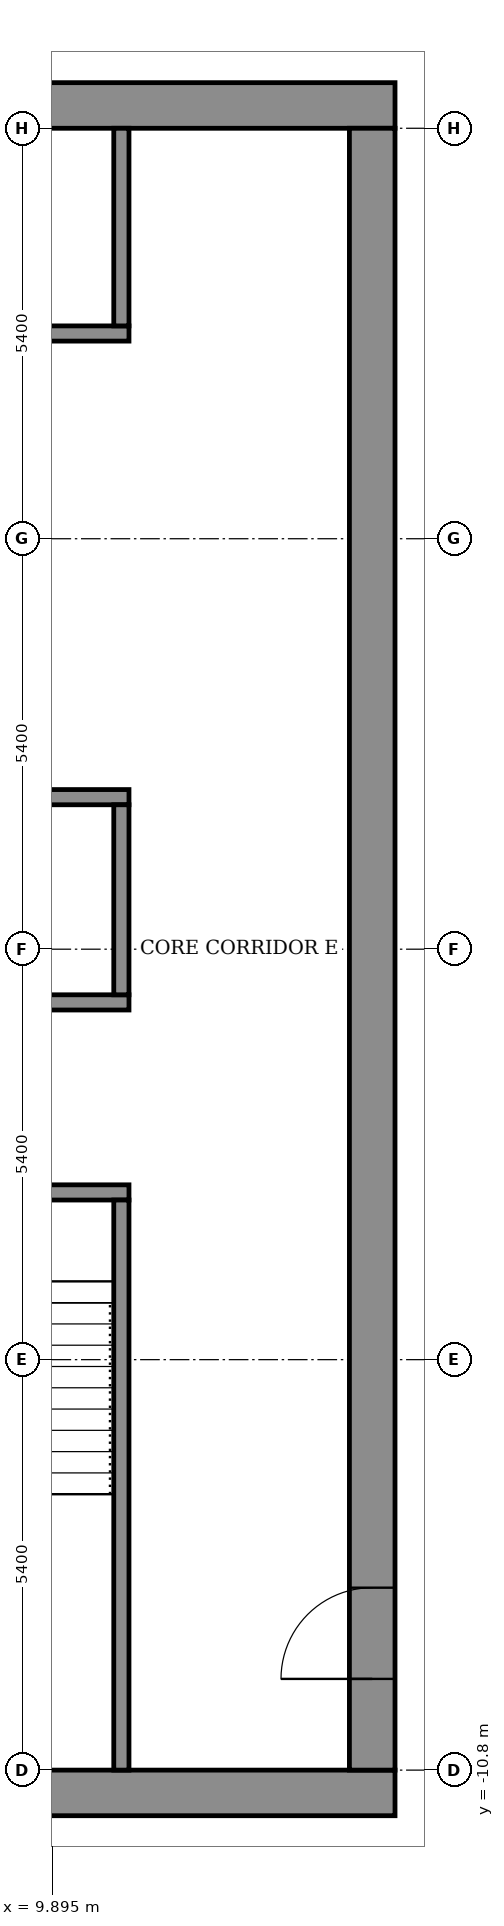
"""IFC4 building model, lengths in metres.
Left out: names, types, materials, properties, quantities, classifications, styles, units other than length and angle.
Written with IfcOpenShell. Run it as: python <this file> out.ifc"""

import sys

from ifc_helpers import new_model, si_unit, direction, frame, frame_2d, origin, place, context, subcontext, project, spatial, rectangle, extrude, element, fill, save


model = new_model("IFC4")
c1 = context("Model", 3, precision=1e-05, world=origin(), true_north=direction((0.0, 1.0)))
c2 = subcontext(c1, "Body", "Model", "MODEL_VIEW")
j1 = project(units=[si_unit("LENGTHUNIT", "METRE"), si_unit("PLANEANGLEUNIT", "RADIAN")], contexts=[c1])
p1 = place(None, origin())
s1 = spatial("IfcSite", under=j1, at=p1, CompositionType="ELEMENT")
p2 = place(p1, origin())
s2 = spatial("IfcBuilding", under=s1, at=p2, CompositionType="ELEMENT")
p3 = place(p2, frame((0.0, 0.0, 342.5)))
s3 = spatial("IfcBuildingStorey", under=s2, at=p3, CompositionType="ELEMENT", Elevation=342.5)
for number, where, z_axis, x_axis in (
    (1, (-14.4, -11.1, 0.0), (0.0, 0.0, 1.0), (1.0, 0.0, 0.0)),
    (2, (-14.4, 11.1, 0.0), (0.0, 0.0, 1.0), (1.0, 0.0, 0.0)),
):
    element("IfcWall", number, at=place(p3, frame(where, z_axis=z_axis, x_axis=x_axis)), inside=s3, PredefinedType="SHEAR", context=c2, shape_type="SweptSolid", body=[
        extrude(rectangle(XDim=28.8, YDim=0.6, at=frame_2d((14.4, 0.0))), origin(), (0.0, 0.0, 1.0), 3.6),
    ])
p4 = place(p3, frame((14.1, -10.8, 0.0), z_axis=(0.0, 0.0, 1.0), x_axis=(0.0, 1.0, 0.0)))
e3 = element("IfcWall", 3, at=p4, inside=s3, PredefinedType="SHEAR", context=c2, shape_type="SweptSolid", body=[
    extrude(rectangle(XDim=21.6, YDim=0.6, at=frame_2d((10.8, 0.0))), origin(), (0.0, 0.0, 1.0), 3.6),
])
p5 = place(p4, frame((1.2, 0.0, 0.0)))
e4 = element("IfcOpeningElement", 4, at=p5, cuts=e3, PredefinedType="OPENING", context=c2, shape_type="SweptSolid", body=[
    extrude(rectangle(XDim=1.2, YDim=2.1, at=frame_2d((0.6, 1.05))), frame((0.0, 0.31, 0.0), z_axis=(0.0, -1.0, 0.0), x_axis=(1.0, 0.0, 0.0)), (0.0, 0.0, 1.0), 0.62),
])
p6 = place(p3, frame((-10.9, -3.2, 0.0), z_axis=(0.0, 0.0, 1.0), x_axis=(1.0, 0.0, 0.0)))
e5 = element("IfcWall", 5, at=p6, inside=s3, PredefinedType="SHEAR", context=c2, shape_type="SweptSolid", body=[
    extrude(rectangle(XDim=21.8, YDim=0.2, at=frame_2d((10.9, 0.0))), origin(), (0.0, 0.0, 1.0), 3.05),
])
p7 = place(p6, frame((1.075, 0.0, 0.0)))
e6 = element("IfcOpeningElement", 6, at=p7, cuts=e5, PredefinedType="OPENING", context=c2, shape_type="SweptSolid", body=[
    extrude(rectangle(XDim=1.1, YDim=2.1, at=frame_2d((0.55, 1.05))), frame((0.0, 0.11, 0.0), z_axis=(0.0, -1.0, 0.0), x_axis=(1.0, 0.0, 0.0)), (0.0, 0.0, 1.0), 0.22),
])
p8 = place(p6, frame((10.325, 0.0, 0.0)))
e7 = element("IfcOpeningElement", 7, at=p8, cuts=e5, PredefinedType="OPENING", context=c2, shape_type="SweptSolid", body=[
    extrude(rectangle(XDim=1.1, YDim=2.1, at=frame_2d((0.55, 1.05))), frame((0.0, 0.11, 0.0), z_axis=(0.0, -1.0, 0.0), x_axis=(1.0, 0.0, 0.0)), (0.0, 0.0, 1.0), 0.22),
])
p9 = place(p6, frame((19.625, 0.0, 0.0)))
e8 = element("IfcOpeningElement", 8, at=p9, cuts=e5, PredefinedType="OPENING", context=c2, shape_type="SweptSolid", body=[
    extrude(rectangle(XDim=1.1, YDim=2.1, at=frame_2d((0.55, 1.05))), frame((0.0, 0.11, 0.0), z_axis=(0.0, -1.0, 0.0), x_axis=(1.0, 0.0, 0.0)), (0.0, 0.0, 1.0), 0.22),
])
p10 = place(p6, frame((5.7, 0.0, 0.0)))
e9 = element("IfcOpeningElement", 9, at=p10, cuts=e5, PredefinedType="OPENING", context=c2, shape_type="SweptSolid", body=[
    extrude(rectangle(XDim=1.1, YDim=2.1, at=frame_2d((0.55, 1.05))), frame((0.0, 0.11, 0.0), z_axis=(0.0, -1.0, 0.0), x_axis=(1.0, 0.0, 0.0)), (0.0, 0.0, 1.0), 0.22),
])
p11 = place(p6, frame((14.975, 0.0, 0.0)))
e10 = element("IfcOpeningElement", 10, at=p11, cuts=e5, PredefinedType="OPENING", context=c2, shape_type="SweptSolid", body=[
    extrude(rectangle(XDim=1.1, YDim=2.1, at=frame_2d((0.55, 1.05))), frame((0.0, 0.11, 0.0), z_axis=(0.0, -1.0, 0.0), x_axis=(1.0, 0.0, 0.0)), (0.0, 0.0, 1.0), 0.22),
])
p12 = place(p3, frame((-10.9, -0.7, 0.0), z_axis=(0.0, 0.0, 1.0), x_axis=(1.0, 0.0, 0.0)))
e11 = element("IfcWall", 11, at=p12, inside=s3, PredefinedType="SHEAR", context=c2, shape_type="SweptSolid", body=[
    extrude(rectangle(XDim=21.8, YDim=0.2, at=frame_2d((10.9, 0.0))), origin(), (0.0, 0.0, 1.0), 3.05),
])
p13 = place(p3, frame((-10.9, 2.0, 0.0), z_axis=(0.0, 0.0, 1.0), x_axis=(1.0, 0.0, 0.0)))
e12 = element("IfcWall", 12, at=p13, inside=s3, PredefinedType="SHEAR", context=c2, shape_type="SweptSolid", body=[
    extrude(rectangle(XDim=21.8, YDim=0.2, at=frame_2d((10.9, 0.0))), origin(), (0.0, 0.0, 1.0), 3.05),
])
p14 = place(p13, frame((4.95, 0.0, 0.0)))
e13 = element("IfcOpeningElement", 13, at=p14, cuts=e12, PredefinedType="OPENING", context=c2, shape_type="SweptSolid", body=[
    extrude(rectangle(XDim=1.1, YDim=2.1, at=frame_2d((0.55, 1.05))), frame((0.0, 0.11, 0.0), z_axis=(0.0, -1.0, 0.0), x_axis=(1.0, 0.0, 0.0)), (0.0, 0.0, 1.0), 0.22),
])
p15 = place(p13, frame((7.65, 0.0, 0.0)))
e14 = element("IfcOpeningElement", 14, at=p15, cuts=e12, PredefinedType="OPENING", context=c2, shape_type="SweptSolid", body=[
    extrude(rectangle(XDim=1.1, YDim=2.1, at=frame_2d((0.55, 1.05))), frame((0.0, 0.11, 0.0), z_axis=(0.0, -1.0, 0.0), x_axis=(1.0, 0.0, 0.0)), (0.0, 0.0, 1.0), 0.22),
])
p16 = place(p13, frame((10.35, 0.0, 0.0)))
e15 = element("IfcOpeningElement", 15, at=p16, cuts=e12, PredefinedType="OPENING", context=c2, shape_type="SweptSolid", body=[
    extrude(rectangle(XDim=1.1, YDim=2.1, at=frame_2d((0.55, 1.05))), frame((0.0, 0.11, 0.0), z_axis=(0.0, -1.0, 0.0), x_axis=(1.0, 0.0, 0.0)), (0.0, 0.0, 1.0), 0.22),
])
p17 = place(p13, frame((1.675, 0.0, 0.0)))
e16 = element("IfcOpeningElement", 16, at=p17, cuts=e12, PredefinedType="OPENING", context=c2, shape_type="SweptSolid", body=[
    extrude(rectangle(XDim=0.9, YDim=2.1, at=frame_2d((0.45, 1.05))), frame((0.0, 0.11, 0.0), z_axis=(0.0, -1.0, 0.0), x_axis=(1.0, 0.0, 0.0)), (0.0, 0.0, 1.0), 0.22),
])
p18 = place(p13, frame((16.525, 0.0, 0.0)))
e17 = element("IfcOpeningElement", 17, at=p18, cuts=e12, PredefinedType="OPENING", context=c2, shape_type="SweptSolid", body=[
    extrude(rectangle(XDim=0.9, YDim=2.1, at=frame_2d((0.45, 1.05))), frame((0.0, 0.11, 0.0), z_axis=(0.0, -1.0, 0.0), x_axis=(1.0, 0.0, 0.0)), (0.0, 0.0, 1.0), 0.22),
])
p19 = place(p3, frame((-10.9, 8.1, 0.0), z_axis=(0.0, 0.0, 1.0), x_axis=(1.0, 0.0, 0.0)))
e18 = element("IfcWall", 18, at=p19, inside=s3, PredefinedType="SHEAR", context=c2, shape_type="SweptSolid", body=[
    extrude(rectangle(XDim=21.8, YDim=0.2, at=frame_2d((10.9, 0.0))), origin(), (0.0, 0.0, 1.0), 3.05),
])
p20 = place(p19, frame((4.95, 0.0, 0.0)))
e19 = element("IfcOpeningElement", 19, at=p20, cuts=e18, PredefinedType="OPENING", context=c2, shape_type="SweptSolid", body=[
    extrude(rectangle(XDim=1.1, YDim=2.1, at=frame_2d((0.55, 1.05))), frame((0.0, 0.11, 0.0), z_axis=(0.0, -1.0, 0.0), x_axis=(1.0, 0.0, 0.0)), (0.0, 0.0, 1.0), 0.22),
])
p21 = place(p19, frame((7.65, 0.0, 0.0)))
e20 = element("IfcOpeningElement", 20, at=p21, cuts=e18, PredefinedType="OPENING", context=c2, shape_type="SweptSolid", body=[
    extrude(rectangle(XDim=1.1, YDim=2.1, at=frame_2d((0.55, 1.05))), frame((0.0, 0.11, 0.0), z_axis=(0.0, -1.0, 0.0), x_axis=(1.0, 0.0, 0.0)), (0.0, 0.0, 1.0), 0.22),
])
p22 = place(p19, frame((10.35, 0.0, 0.0)))
e21 = element("IfcOpeningElement", 21, at=p22, cuts=e18, PredefinedType="OPENING", context=c2, shape_type="SweptSolid", body=[
    extrude(rectangle(XDim=1.1, YDim=2.1, at=frame_2d((0.55, 1.05))), frame((0.0, 0.11, 0.0), z_axis=(0.0, -1.0, 0.0), x_axis=(1.0, 0.0, 0.0)), (0.0, 0.0, 1.0), 0.22),
])
p23 = place(p19, frame((1.675, 0.0, 0.0)))
e22 = element("IfcOpeningElement", 22, at=p23, cuts=e18, PredefinedType="OPENING", context=c2, shape_type="SweptSolid", body=[
    extrude(rectangle(XDim=0.9, YDim=2.1, at=frame_2d((0.45, 1.05))), frame((0.0, 0.11, 0.0), z_axis=(0.0, -1.0, 0.0), x_axis=(1.0, 0.0, 0.0)), (0.0, 0.0, 1.0), 0.22),
])
p24 = place(p19, frame((13.825, 0.0, 0.0)))
e23 = element("IfcOpeningElement", 23, at=p24, cuts=e18, PredefinedType="OPENING", context=c2, shape_type="SweptSolid", body=[
    extrude(rectangle(XDim=0.9, YDim=2.1, at=frame_2d((0.45, 1.05))), frame((0.0, 0.11, 0.0), z_axis=(0.0, -1.0, 0.0), x_axis=(1.0, 0.0, 0.0)), (0.0, 0.0, 1.0), 0.22),
])
p25 = place(p19, frame((18.55, 0.0, 0.0)))
e24 = element("IfcOpeningElement", 24, at=p25, cuts=e18, PredefinedType="OPENING", context=c2, shape_type="SweptSolid", body=[
    extrude(rectangle(XDim=0.9, YDim=2.1, at=frame_2d((0.45, 1.05))), frame((0.0, 0.11, 0.0), z_axis=(0.0, -1.0, 0.0), x_axis=(1.0, 0.0, 0.0)), (0.0, 0.0, 1.0), 0.22),
])
p26 = place(p3, frame((10.8, -10.8, 0.0), z_axis=(0.0, 0.0, 1.0), x_axis=(0.0, 1.0, 0.0)))
e25 = element("IfcWall", 25, at=p26, inside=s3, PredefinedType="SHEAR", context=c2, shape_type="SweptSolid", body=[
    extrude(rectangle(XDim=7.5, YDim=0.2, at=frame_2d((3.75, 0.0))), origin(), (0.0, 0.0, 1.0), 3.05),
])
p27 = place(p3, frame((10.8, -0.6, 0.0), z_axis=(0.0, 0.0, 1.0), x_axis=(0.0, 1.0, 0.0)))
e26 = element("IfcWall", 26, at=p27, inside=s3, PredefinedType="STANDARD", context=c2, shape_type="SweptSolid", body=[
    extrude(rectangle(XDim=2.5, YDim=0.2, at=frame_2d((1.25, 0.0))), origin(), (0.0, 0.0, 1.0), 3.05),
])
p28 = place(p3, frame((10.8, 8.2, 0.0), z_axis=(0.0, 0.0, 1.0), x_axis=(0.0, 1.0, 0.0)))
e27 = element("IfcWall", 27, at=p28, inside=s3, PredefinedType="STANDARD", context=c2, shape_type="SweptSolid", body=[
    extrude(rectangle(XDim=2.6, YDim=0.2, at=frame_2d((1.3, 0.0))), origin(), (0.0, 0.0, 1.0), 3.05),
])
p29 = place(p5, origin())
e28 = element("IfcDoor", 28, at=p29, inside=s3, OperationType="DOUBLE_DOOR_SINGLE_SWING", PredefinedType="DOOR", context=c2, shape_type="SweptSolid", body=[
    extrude(rectangle(XDim=1.2, YDim=2.1, at=frame_2d((0.6, 1.05))), frame((0.0, 0.025, 0.0), z_axis=(0.0, -1.0, 0.0), x_axis=(1.0, 0.0, 0.0)), (0.0, 0.0, 1.0), 0.05),
])
fill(e4, e28)
save(model, sys.argv[1])
